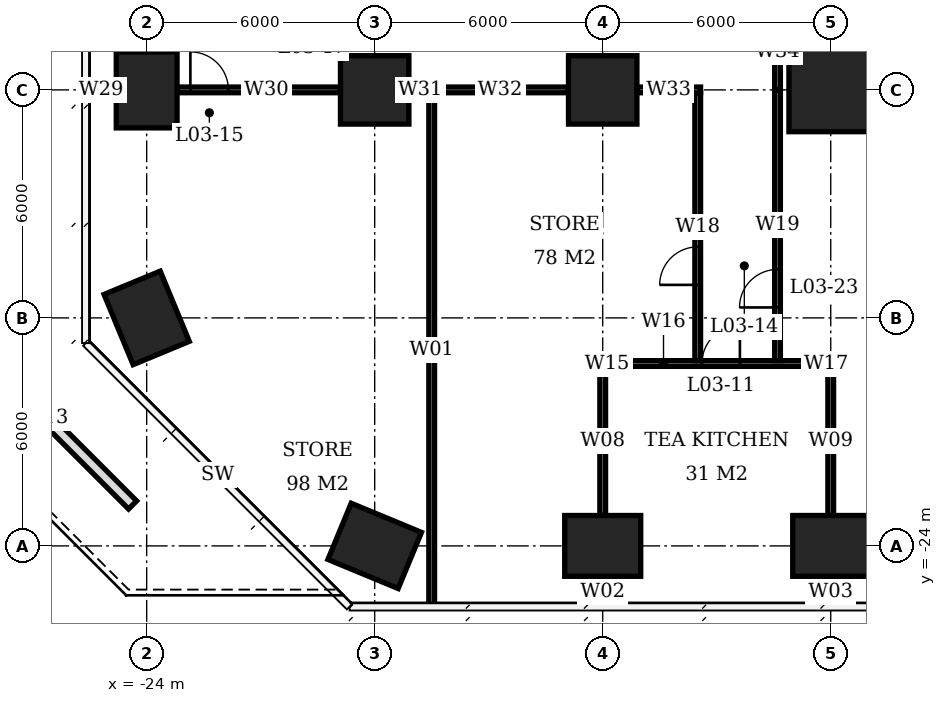
"""IFC4 building model, lengths in metres.
Left out: names, types, materials, properties, quantities, classifications, styles, units other than length and angle.
Written with IfcOpenShell. Run it as: python <this file> out.ifc"""

import sys

from ifc_helpers import new_model, si_unit, direction, frame, frame_2d, origin, origin_2d, place, context, subcontext, project, spatial, rectangle, extrude, element, fill, save


model = new_model("IFC4")
c1 = context("Model", 3, precision=1e-05, world=origin(), true_north=direction((0.0, 1.0)))
c2 = subcontext(c1, "Body", "Model", "MODEL_VIEW")
j1 = project(units=[si_unit("LENGTHUNIT", "METRE"), si_unit("PLANEANGLEUNIT", "RADIAN")], contexts=[c1])
p1 = place(None, origin())
s1 = spatial("IfcSite", under=j1, at=p1, CompositionType="ELEMENT")
p2 = place(p1, origin())
s2 = spatial("IfcBuilding", under=s1, at=p2, CompositionType="ELEMENT")
p3 = place(p2, frame((0.0, 0.0, 18.2)))
s3 = spatial("IfcBuildingStorey", under=s2, at=p3, CompositionType="ELEMENT", Elevation=18.2)
for number, where, z_axis, x_axis in (
    (1, (-24.0, -18.0, 0.0), (0.0, 0.0, 1.0), (-0.383, 0.924, 0.0)),
    (2, (-24.0, -12.0, 0.0), (0.0, 0.0, 1.0), (0.0, 1.0, 0.0)),
    (3, (-18.0, -24.0, 0.0), (0.0, 0.0, 1.0), (-0.924, 0.383, 0.0)),
):
    element("IfcColumn", number, at=place(p3, frame(where, z_axis=z_axis, x_axis=x_axis)), inside=s3, PredefinedType="COLUMN", context=c2, shape_type="SweptSolid", body=[
        extrude(rectangle(XDim=2.0, YDim=1.6, at=origin_2d()), origin(), (0.0, 0.0, 1.0), 3.9),
    ])
p4 = place(p3, frame((-18.0, -12.0, 0.0), z_axis=(0.0, 0.0, 1.0), x_axis=(1.0, 0.0, 0.0)))
e4 = element("IfcColumn", 4, at=p4, inside=s3, PredefinedType="COLUMN", context=c2, shape_type="SweptSolid", body=[
    extrude(rectangle(XDim=1.8, YDim=1.8, at=origin_2d()), origin(), (0.0, 0.0, 1.0), 3.9),
])
p5 = place(p3, frame((-12.0, -24.0, 0.0), z_axis=(0.0, 0.0, 1.0), x_axis=(1.0, 0.0, 0.0)))
e5 = element("IfcColumn", 5, at=p5, inside=s3, PredefinedType="COLUMN", context=c2, shape_type="SweptSolid", body=[
    extrude(rectangle(XDim=2.0, YDim=1.6, at=origin_2d()), origin(), (0.0, 0.0, 1.0), 3.9),
])
p6 = place(p3, frame((-12.0, -12.0, 0.0), z_axis=(0.0, 0.0, 1.0), x_axis=(1.0, 0.0, 0.0)))
e6 = element("IfcColumn", 6, at=p6, inside=s3, PredefinedType="COLUMN", context=c2, shape_type="SweptSolid", body=[
    extrude(rectangle(XDim=1.8, YDim=1.8, at=origin_2d()), origin(), (0.0, 0.0, 1.0), 3.9),
])
p7 = place(p3, frame((-6.0, -24.0, 0.0), z_axis=(0.0, 0.0, 1.0), x_axis=(1.0, 0.0, 0.0)))
e7 = element("IfcColumn", 7, at=p7, inside=s3, PredefinedType="COLUMN", context=c2, shape_type="SweptSolid", body=[
    extrude(rectangle(XDim=2.0, YDim=1.6, at=origin_2d()), origin(), (0.0, 0.0, 1.0), 3.9),
])
p8 = place(p3, frame((-6.0, -12.0, 0.0), z_axis=(0.0, 0.0, 1.0), x_axis=(1.0, 0.0, 0.0)))
e8 = element("IfcColumn", 8, at=p8, inside=s3, PredefinedType="COLUMN", context=c2, shape_type="SweptSolid", body=[
    extrude(rectangle(XDim=2.2, YDim=2.2, at=origin_2d()), origin(), (0.0, 0.0, 1.0), 3.9),
])
p9 = place(p3, frame((-24.37, -22.923, 0.0), z_axis=(0.0, 0.0, 1.0), x_axis=(-0.707106781187, 0.707106781187, 0.0)))
e9 = element("IfcWall", 9, at=p9, inside=s3, PredefinedType="USERDEFINED", context=c2, shape_type="SweptSolid", body=[
    extrude(rectangle(XDim=6.438, YDim=0.3, at=frame_2d((3.219, 0.0))), origin(), (0.0, 0.0, 1.0), 0.6),
])
p10 = place(p3, frame((-12.075, -19.2, 0.0), z_axis=(0.0, 0.0, 1.0), x_axis=(1.0, 0.0, 0.0)))
e10 = element("IfcWall", 10, at=p10, inside=s3, PredefinedType="PARTITIONING", context=c2, shape_type="SweptSolid", body=[
    extrude(rectangle(XDim=0.385, YDim=0.15, at=frame_2d((0.192, 0.0))), origin(), (0.0, 0.0, 1.0), 3.05),
])
p11 = place(p3, frame((-11.69, -19.2, 0.0), z_axis=(0.0, 0.0, 1.0), x_axis=(1.0, 0.0, 0.0)))
e11 = element("IfcWall", 11, at=p11, inside=s3, PredefinedType="PARTITIONING", context=c2, shape_type="SweptSolid", body=[
    extrude(rectangle(XDim=5.38, YDim=0.15, at=frame_2d((2.69, 0.0))), origin(), (0.0, 0.0, 1.0), 3.65),
])
p12 = place(p11, frame((2.3, 0.0, 0.0)))
e12 = element("IfcOpeningElement", 12, at=p12, cuts=e11, PredefinedType="OPENING", context=c2, shape_type="SweptSolid", body=[
    extrude(rectangle(XDim=1.0, YDim=2.1, at=frame_2d((0.5, 1.05))), frame((0.0, 0.085, 0.0), z_axis=(0.0, -1.0, 0.0), x_axis=(1.0, 0.0, 0.0)), (0.0, 0.0, 1.0), 0.17),
])
p13 = place(p3, frame((-6.31, -19.2, 0.0), z_axis=(0.0, 0.0, 1.0), x_axis=(1.0, 0.0, 0.0)))
e13 = element("IfcWall", 13, at=p13, inside=s3, PredefinedType="PARTITIONING", context=c2, shape_type="SweptSolid", body=[
    extrude(rectangle(XDim=0.385, YDim=0.15, at=frame_2d((0.192, 0.0))), origin(), (0.0, 0.0, 1.0), 3.05),
])
p14 = place(p3, frame((-12.0, -25.6, 0.0), z_axis=(0.0, 0.0, 1.0), x_axis=(0.0, 1.0, 0.0)))
e14 = element("IfcWall", 14, at=p14, inside=s3, PredefinedType="PARTITIONING", context=c2, shape_type="SweptSolid", body=[
    extrude(rectangle(XDim=0.8, YDim=0.15, at=frame_2d((0.4, 0.0))), origin(), (0.0, 0.0, 1.0), 3.65),
])
p15 = place(p3, frame((-12.0, -23.2, 0.0), z_axis=(0.0, 0.0, 1.0), x_axis=(0.0, 1.0, 0.0)))
e15 = element("IfcWall", 15, at=p15, inside=s3, PredefinedType="PARTITIONING", context=c2, shape_type="SweptSolid", body=[
    extrude(rectangle(XDim=3.925, YDim=0.15, at=frame_2d((1.962, 0.0))), origin(), (0.0, 0.0, 1.0), 3.05),
])
p16 = place(p3, frame((-6.0, -25.6, 0.0), z_axis=(0.0, 0.0, 1.0), x_axis=(0.0, 1.0, 0.0)))
e16 = element("IfcWall", 16, at=p16, inside=s3, PredefinedType="PARTITIONING", context=c2, shape_type="SweptSolid", body=[
    extrude(rectangle(XDim=0.8, YDim=0.15, at=frame_2d((0.4, 0.0))), origin(), (0.0, 0.0, 1.0), 3.65),
])
p17 = place(p3, frame((-6.0, -23.2, 0.0), z_axis=(0.0, 0.0, 1.0), x_axis=(0.0, 1.0, 0.0)))
e17 = element("IfcWall", 17, at=p17, inside=s3, PredefinedType="PARTITIONING", context=c2, shape_type="SweptSolid", body=[
    extrude(rectangle(XDim=3.925, YDim=0.15, at=frame_2d((1.962, 0.0))), origin(), (0.0, 0.0, 1.0), 3.05),
])
p18 = place(p3, frame((-25.6, -12.0, 0.0), z_axis=(0.0, 0.0, 1.0), x_axis=(1.0, 0.0, 0.0)))
e18 = element("IfcWall", 18, at=p18, inside=s3, PredefinedType="PARTITIONING", context=c2, shape_type="SweptSolid", body=[
    extrude(rectangle(XDim=0.8, YDim=0.15, at=frame_2d((0.4, 0.0))), origin(), (0.0, 0.0, 1.0), 3.65),
])
p19 = place(p3, frame((-23.2, -12.0, 0.0), z_axis=(0.0, 0.0, 1.0), x_axis=(1.0, 0.0, 0.0)))
e19 = element("IfcWall", 19, at=p19, inside=s3, PredefinedType="PARTITIONING", context=c2, shape_type="SweptSolid", body=[
    extrude(rectangle(XDim=4.3, YDim=0.15, at=frame_2d((2.15, 0.0))), origin(), (0.0, 0.0, 1.0), 3.65),
])
p20 = place(p19, frame((0.35, 0.0, 0.0)))
e20 = element("IfcOpeningElement", 20, at=p20, cuts=e19, PredefinedType="OPENING", context=c2, shape_type="SweptSolid", body=[
    extrude(rectangle(XDim=1.0, YDim=2.1, at=frame_2d((0.5, 1.05))), frame((0.0, 0.085, 0.0), z_axis=(0.0, -1.0, 0.0), x_axis=(1.0, 0.0, 0.0)), (0.0, 0.0, 1.0), 0.17),
])
p21 = place(p3, frame((-17.1, -12.0, 0.0), z_axis=(0.0, 0.0, 1.0), x_axis=(1.0, 0.0, 0.0)))
e21 = element("IfcWall", 21, at=p21, inside=s3, PredefinedType="PARTITIONING", context=c2, shape_type="SweptSolid", body=[
    extrude(rectangle(XDim=0.6, YDim=0.15, at=frame_2d((0.3, 0.0))), origin(), (0.0, 0.0, 1.0), 3.65),
])
p22 = place(p3, frame((-16.5, -25.6, 0.0), z_axis=(0.0, 0.0, 1.0), x_axis=(0.0, 1.0, 0.0)))
e22 = element("IfcWall", 22, at=p22, inside=s3, PredefinedType="PARTITIONING", context=c2, shape_type="SweptSolid", body=[
    extrude(rectangle(XDim=13.525, YDim=0.15, at=frame_2d((6.763, 0.0))), origin(), (0.0, 0.0, 1.0), 3.65),
])
p23 = place(p3, frame((-16.5, -12.0, 0.0), z_axis=(0.0, 0.0, 1.0), x_axis=(1.0, 0.0, 0.0)))
e23 = element("IfcWall", 23, at=p23, inside=s3, PredefinedType="PARTITIONING", context=c2, shape_type="SweptSolid", body=[
    extrude(rectangle(XDim=3.6, YDim=0.15, at=frame_2d((1.8, 0.0))), origin(), (0.0, 0.0, 1.0), 3.65),
])
p24 = place(p3, frame((-11.1, -12.0, 0.0), z_axis=(0.0, 0.0, 1.0), x_axis=(1.0, 0.0, 0.0)))
e24 = element("IfcWall", 24, at=p24, inside=s3, PredefinedType="PARTITIONING", context=c2, shape_type="SweptSolid", body=[
    extrude(rectangle(XDim=1.675, YDim=0.15, at=frame_2d((0.837, 0.0))), origin(), (0.0, 0.0, 1.0), 3.65),
])
p25 = place(p3, frame((-9.5, -19.125, 0.0), z_axis=(0.0, 0.0, 1.0), x_axis=(0.0, 1.0, 0.0)))
e25 = element("IfcWall", 25, at=p25, inside=s3, PredefinedType="PARTITIONING", context=c2, shape_type="SweptSolid", body=[
    extrude(rectangle(XDim=7.05, YDim=0.15, at=frame_2d((3.525, 0.0))), origin(), (0.0, 0.0, 1.0), 3.65),
])
p26 = place(p25, frame((1.994, 0.0, 0.0)))
e26 = element("IfcOpeningElement", 26, at=p26, cuts=e25, PredefinedType="OPENING", context=c2, shape_type="SweptSolid", body=[
    extrude(rectangle(XDim=1.0, YDim=2.1, at=frame_2d((0.5, 1.05))), frame((0.0, 0.085, 0.0), z_axis=(0.0, -1.0, 0.0), x_axis=(1.0, 0.0, 0.0)), (0.0, 0.0, 1.0), 0.17),
])
p27 = place(p3, frame((-7.4, -19.125, 0.0), z_axis=(0.0, 0.0, 1.0), x_axis=(0.0, 1.0, 0.0)))
e27 = element("IfcWall", 27, at=p27, inside=s3, PredefinedType="PARTITIONING", context=c2, shape_type="SweptSolid", body=[
    extrude(rectangle(XDim=7.125, YDim=0.15, at=frame_2d((3.562, 0.0))), origin(), (0.0, 0.0, 1.0), 3.65),
])
p28 = place(p27, frame((1.4, 0.0, 0.0)))
e28 = element("IfcOpeningElement", 28, at=p28, cuts=e27, PredefinedType="OPENING", context=c2, shape_type="SweptSolid", body=[
    extrude(rectangle(XDim=1.0, YDim=2.1, at=frame_2d((0.5, 1.05))), frame((0.0, 0.085, 0.0), z_axis=(0.0, -1.0, 0.0), x_axis=(1.0, 0.0, 0.0)), (0.0, 0.0, 1.0), 0.17),
])
p29 = place(p3, frame((-7.4, -12.0, 0.0), z_axis=(0.0, 0.0, 1.0), x_axis=(0.0, 1.0, 0.0)))
e29 = element("IfcWall", 29, at=p29, inside=s3, PredefinedType="PARTITIONING", context=c2, shape_type="SweptSolid", body=[
    extrude(rectangle(XDim=2.0, YDim=0.15, at=frame_2d((1.0, 0.0))), origin(), (0.0, 0.0, 1.0), 3.65),
])
p30 = place(p12, origin())
e30 = element("IfcDoor", 30, at=p30, inside=s3, OperationType="SINGLE_SWING_RIGHT", PredefinedType="DOOR", context=c2, shape_type="SweptSolid", body=[
    extrude(rectangle(XDim=1.0, YDim=2.1, at=frame_2d((0.5, 1.05))), frame((0.0, 0.025, 0.0), z_axis=(0.0, -1.0, 0.0), x_axis=(1.0, 0.0, 0.0)), (0.0, 0.0, 1.0), 0.05),
])
fill(e12, e30)
p31 = place(p26, origin())
e31 = element("IfcDoor", 31, at=p31, inside=s3, OperationType="SINGLE_SWING_LEFT", PredefinedType="DOOR", context=c2, shape_type="SweptSolid", body=[
    extrude(rectangle(XDim=1.0, YDim=2.1, at=frame_2d((0.5, 1.05))), frame((0.0, 0.025, 0.0), z_axis=(0.0, -1.0, 0.0), x_axis=(1.0, 0.0, 0.0)), (0.0, 0.0, 1.0), 0.05),
])
fill(e26, e31)
p32 = place(p20, origin())
e32 = element("IfcDoor", 32, at=p32, inside=s3, OperationType="SINGLE_SWING_LEFT", PredefinedType="DOOR", context=c2, shape_type="SweptSolid", body=[
    extrude(rectangle(XDim=1.0, YDim=2.1, at=frame_2d((0.5, 1.05))), frame((0.0, 0.025, 0.0), z_axis=(0.0, -1.0, 0.0), x_axis=(1.0, 0.0, 0.0)), (0.0, 0.0, 1.0), 0.05),
])
fill(e20, e32)
p33 = place(p28, origin())
e33 = element("IfcDoor", 33, at=p33, inside=s3, OperationType="SINGLE_SWING_LEFT", PredefinedType="DOOR", context=c2, shape_type="SweptSolid", body=[
    extrude(rectangle(XDim=1.0, YDim=2.1, at=frame_2d((0.5, 1.05))), frame((0.0, 0.025, 0.0), z_axis=(0.0, -1.0, 0.0), x_axis=(1.0, 0.0, 0.0)), (0.0, 0.0, 1.0), 0.05),
])
fill(e28, e33)
save(model, sys.argv[1])
